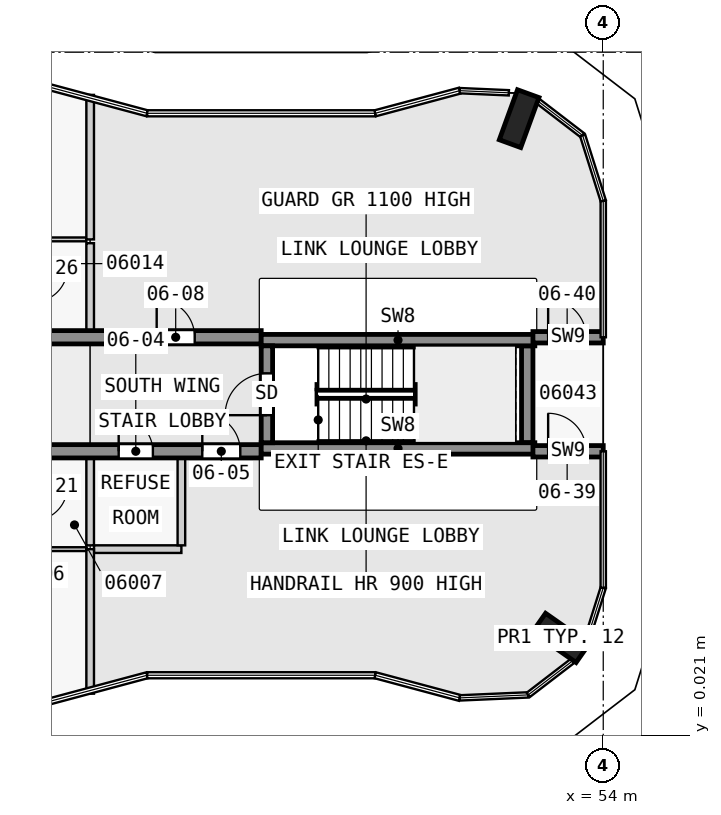
"""IFC4 building model, lengths in metres.
Left out: names, types, materials, properties, quantities, classifications, styles, units other than length and angle.
Written with IfcOpenShell. Run it as: python <this file> out.ifc"""

import sys

from ifc_helpers import new_model, si_unit, direction, frame, frame_2d, origin, origin_2d, place, context, subcontext, project, spatial, rectangle, extrude, element, fill, save


model = new_model("IFC4")
c1 = context("Model", 3, precision=1e-05, world=origin(), true_north=direction((0.0, 1.0)))
c2 = subcontext(c1, "Body", "Model", "MODEL_VIEW")
j1 = project(units=[si_unit("LENGTHUNIT", "METRE"), si_unit("PLANEANGLEUNIT", "RADIAN")], contexts=[c1])
p1 = place(None, origin())
s1 = spatial("IfcSite", under=j1, at=p1, CompositionType="ELEMENT")
p2 = place(p1, origin())
s2 = spatial("IfcBuilding", under=s1, at=p2, CompositionType="ELEMENT")
p3 = place(p2, frame((0.0, 0.0, 30.3)))
s3 = spatial("IfcBuildingStorey", under=s2, at=p3, CompositionType="ELEMENT", Elevation=30.3)
for number, where, z_axis, x_axis in (
    (1, (52.884, 2.59, 0.0), (0.0, 0.0, 1.0), (0.574, 0.819, 0.0)),
    (2, (51.787, 16.252, 0.0), (0.0, 0.0, 1.0), (-0.94, 0.342, 0.0)),
):
    element("IfcColumn", number, at=place(p3, frame(where, z_axis=z_axis, x_axis=x_axis)), inside=s3, PredefinedType="COLUMN", context=c2, shape_type="SweptSolid", body=[
        extrude(rectangle(XDim=0.6, YDim=1.4, at=origin_2d()), origin(), (0.0, 0.0, 1.0), 3.5),
    ])
p4 = place(p3, frame((45.15, 7.725, 0.0), z_axis=(0.0, 0.0, 1.0), x_axis=(0.0, 1.0, 0.0)))
e3 = element("IfcWall", 3, at=p4, inside=s3, PredefinedType="SHEAR", context=c2, shape_type="SweptSolid", body=[
    extrude(rectangle(XDim=2.55, YDim=0.3, at=frame_2d((1.275, 0.0))), origin(), (0.0, 0.0, 1.0), 3.5),
])
p5 = place(p4, frame((0.725, 0.0, 0.0)))
e4 = element("IfcOpeningElement", 4, at=p5, cuts=e3, PredefinedType="OPENING", context=c2, shape_type="SweptSolid", body=[
    extrude(rectangle(XDim=1.1, YDim=2.1, at=frame_2d((0.55, 1.05))), frame((0.0, 0.16, 0.0), z_axis=(0.0, -1.0, 0.0), x_axis=(1.0, 0.0, 0.0)), (0.0, 0.0, 1.0), 0.32),
])
p6 = place(p3, frame((52.0, 7.725, 0.0), z_axis=(0.0, 0.0, 1.0), x_axis=(0.0, 1.0, 0.0)))
e5 = element("IfcWall", 5, at=p6, inside=s3, PredefinedType="SHEAR", context=c2, shape_type="SweptSolid", body=[
    extrude(rectangle(XDim=2.55, YDim=0.3, at=frame_2d((1.275, 0.0))), origin(), (0.0, 0.0, 1.0), 3.5),
])
for number, where, z_axis, x_axis in (
    (6, (45.0, 7.575, 0.0), (0.0, 0.0, 1.0), (1.0, 0.0, 0.0)),
    (7, (45.0, 10.425, 0.0), (0.0, 0.0, 1.0), (1.0, 0.0, 0.0)),
):
    element("IfcWall", number, at=place(p3, frame(where, z_axis=z_axis, x_axis=x_axis)), inside=s3, PredefinedType="SHEAR", context=c2, shape_type="SweptSolid", body=[
        extrude(rectangle(XDim=7.2, YDim=0.3, at=frame_2d((3.6, 0.0))), origin(), (0.0, 0.0, 1.0), 3.5),
    ])
p7 = place(p3, frame((52.15, 7.5, 0.0), z_axis=(0.0, 0.0, 1.0), x_axis=(1.0, 0.0, 0.0)))
e8 = element("IfcWall", 8, at=p7, inside=s3, PredefinedType="SHEAR", context=c2, shape_type="SweptSolid", body=[
    extrude(rectangle(XDim=1.85, YDim=0.3, at=frame_2d((0.925, 0.0))), origin(), (0.0, 0.0, 1.0), 3.25),
])
p8 = place(p7, frame((0.4, 0.0, 0.0)))
e9 = element("IfcOpeningElement", 9, at=p8, cuts=e8, PredefinedType="OPENING", context=c2, shape_type="SweptSolid", body=[
    extrude(rectangle(XDim=1.0, YDim=2.1, at=frame_2d((0.5, 1.05))), frame((0.0, 0.16, 0.0), z_axis=(0.0, -1.0, 0.0), x_axis=(1.0, 0.0, 0.0)), (0.0, 0.0, 1.0), 0.32),
])
p9 = place(p3, frame((52.15, 10.5, 0.0), z_axis=(0.0, 0.0, 1.0), x_axis=(1.0, 0.0, 0.0)))
e10 = element("IfcWall", 10, at=p9, inside=s3, PredefinedType="SHEAR", context=c2, shape_type="SweptSolid", body=[
    extrude(rectangle(XDim=1.85, YDim=0.3, at=frame_2d((0.925, 0.0))), origin(), (0.0, 0.0, 1.0), 3.25),
])
p10 = place(p9, frame((0.4, 0.0, 0.0)))
e11 = element("IfcOpeningElement", 11, at=p10, cuts=e10, PredefinedType="OPENING", context=c2, shape_type="SweptSolid", body=[
    extrude(rectangle(XDim=1.0, YDim=2.1, at=frame_2d((0.5, 1.05))), frame((0.0, 0.16, 0.0), z_axis=(0.0, -1.0, 0.0), x_axis=(1.0, 0.0, 0.0)), (0.0, 0.0, 1.0), 0.32),
])
p11 = place(p3, frame((22.5, 7.5, 0.0), z_axis=(0.0, 0.0, 1.0), x_axis=(1.0, 0.0, 0.0)))
e12 = element("IfcWall", 12, at=p11, inside=s3, PredefinedType="SHEAR", context=c2, shape_type="SweptSolid", body=[
    extrude(rectangle(XDim=22.5, YDim=0.35, at=frame_2d((11.25, 0.0))), origin(), (0.0, 0.0, 1.0), 3.25),
])
p12 = place(p11, frame((4.05, 0.0, 0.0)))
e13 = element("IfcOpeningElement", 13, at=p12, cuts=e12, PredefinedType="OPENING", context=c2, shape_type="SweptSolid", body=[
    extrude(rectangle(XDim=1.0, YDim=2.1, at=frame_2d((0.5, 1.05))), frame((0.0, 0.185, 0.0), z_axis=(0.0, -1.0, 0.0), x_axis=(1.0, 0.0, 0.0)), (0.0, 0.0, 1.0), 0.37),
])
p13 = place(p11, frame((10.75, 0.0, 0.0)))
e14 = element("IfcOpeningElement", 14, at=p13, cuts=e12, PredefinedType="OPENING", context=c2, shape_type="SweptSolid", body=[
    extrude(rectangle(XDim=1.0, YDim=2.1, at=frame_2d((0.5, 1.05))), frame((0.0, 0.185, 0.0), z_axis=(0.0, -1.0, 0.0), x_axis=(1.0, 0.0, 0.0)), (0.0, 0.0, 1.0), 0.37),
])
p14 = place(p11, frame((15.25, 0.0, 0.0)))
e15 = element("IfcOpeningElement", 15, at=p14, cuts=e12, PredefinedType="OPENING", context=c2, shape_type="SweptSolid", body=[
    extrude(rectangle(XDim=1.0, YDim=2.1, at=frame_2d((0.5, 1.05))), frame((0.0, 0.185, 0.0), z_axis=(0.0, -1.0, 0.0), x_axis=(1.0, 0.0, 0.0)), (0.0, 0.0, 1.0), 0.37),
])
p15 = place(p11, frame((18.75, 0.0, 0.0)))
e16 = element("IfcOpeningElement", 16, at=p15, cuts=e12, PredefinedType="OPENING", context=c2, shape_type="SweptSolid", body=[
    extrude(rectangle(XDim=0.9, YDim=2.1, at=frame_2d((0.45, 1.05))), frame((0.0, 0.185, 0.0), z_axis=(0.0, -1.0, 0.0), x_axis=(1.0, 0.0, 0.0)), (0.0, 0.0, 1.0), 0.37),
])
p16 = place(p11, frame((20.95, 0.0, 0.0)))
e17 = element("IfcOpeningElement", 17, at=p16, cuts=e12, PredefinedType="OPENING", context=c2, shape_type="SweptSolid", body=[
    extrude(rectangle(XDim=1.0, YDim=2.1, at=frame_2d((0.5, 1.05))), frame((0.0, 0.185, 0.0), z_axis=(0.0, -1.0, 0.0), x_axis=(1.0, 0.0, 0.0)), (0.0, 0.0, 1.0), 0.37),
])
p17 = place(p3, frame((22.5, 10.5, 0.0), z_axis=(0.0, 0.0, 1.0), x_axis=(1.0, 0.0, 0.0)))
e18 = element("IfcWall", 18, at=p17, inside=s3, PredefinedType="SHEAR", context=c2, shape_type="SweptSolid", body=[
    extrude(rectangle(XDim=22.5, YDim=0.35, at=frame_2d((11.25, 0.0))), origin(), (0.0, 0.0, 1.0), 3.25),
])
p18 = place(p17, frame((6.05, 0.0, 0.0)))
e19 = element("IfcOpeningElement", 19, at=p18, cuts=e18, PredefinedType="OPENING", context=c2, shape_type="SweptSolid", body=[
    extrude(rectangle(XDim=1.0, YDim=2.1, at=frame_2d((0.5, 1.05))), frame((0.0, 0.185, 0.0), z_axis=(0.0, -1.0, 0.0), x_axis=(1.0, 0.0, 0.0)), (0.0, 0.0, 1.0), 0.37),
])
p19 = place(p17, frame((15.25, 0.0, 0.0)))
e20 = element("IfcOpeningElement", 20, at=p19, cuts=e18, PredefinedType="OPENING", context=c2, shape_type="SweptSolid", body=[
    extrude(rectangle(XDim=1.0, YDim=2.1, at=frame_2d((0.5, 1.05))), frame((0.0, 0.185, 0.0), z_axis=(0.0, -1.0, 0.0), x_axis=(1.0, 0.0, 0.0)), (0.0, 0.0, 1.0), 0.37),
])
p20 = place(p17, frame((19.75, 0.0, 0.0)))
e21 = element("IfcOpeningElement", 21, at=p20, cuts=e18, PredefinedType="OPENING", context=c2, shape_type="SweptSolid", body=[
    extrude(rectangle(XDim=1.0, YDim=2.1, at=frame_2d((0.5, 1.05))), frame((0.0, 0.185, 0.0), z_axis=(0.0, -1.0, 0.0), x_axis=(1.0, 0.0, 0.0)), (0.0, 0.0, 1.0), 0.37),
])
p21 = place(p3, frame((39.05, 4.925, 0.0), z_axis=(0.0, 0.0, 1.0), x_axis=(1.0, 0.0, 0.0)))
e22 = element("IfcWall", 22, at=p21, inside=s3, PredefinedType="PARTITIONING", context=c2, shape_type="SweptSolid", body=[
    extrude(rectangle(XDim=1.35, YDim=0.1, at=frame_2d((0.675, 0.0))), origin(), (0.0, 0.0, 1.0), 3.25),
])
p22 = place(p3, frame((40.6, 4.925, 0.0), z_axis=(0.0, 0.0, 1.0), x_axis=(1.0, 0.0, 0.0)))
e23 = element("IfcWall", 23, at=p22, inside=s3, PredefinedType="PARTITIONING", context=c2, shape_type="SweptSolid", body=[
    extrude(rectangle(XDim=2.3, YDim=0.2, at=frame_2d((1.15, 0.0))), origin(), (0.0, 0.0, 1.0), 3.25),
])
p23 = place(p3, frame((40.4, 13.075, 0.0), z_axis=(0.0, 0.0, 1.0), x_axis=(-1.0, 0.0, 0.0)))
e24 = element("IfcWall", 24, at=p23, inside=s3, PredefinedType="PARTITIONING", context=c2, shape_type="SweptSolid", body=[
    extrude(rectangle(XDim=1.35, YDim=0.1, at=frame_2d((0.675, 0.0))), origin(), (0.0, 0.0, 1.0), 3.25),
])
for number, where, z_axis, x_axis in (
    (25, (40.5, 4.925, 0.0), (0.0, 0.0, 1.0), (0.0, -1.0, 0.0)),
    (26, (40.5, 16.878, 0.0), (0.0, 0.0, 1.0), (0.0, -1.0, 0.0)),
):
    element("IfcWall", number, at=place(p3, frame(where, z_axis=z_axis, x_axis=x_axis)), inside=s3, PredefinedType="PARTITIONING", context=c2, shape_type="SweptSolid", body=[
        extrude(rectangle(XDim=3.803, YDim=0.2, at=frame_2d((1.901, 0.0))), origin(), (0.0, 0.0, 1.0), 3.25),
    ])
for number, where, z_axis, x_axis in (
    (27, (40.5, 5.025, 0.0), (0.0, 0.0, 1.0), (0.0, 1.0, 0.0)),
    (28, (40.5, 10.675, 0.0), (0.0, 0.0, 1.0), (0.0, 1.0, 0.0)),
    (29, (42.9, 5.025, 0.0), (0.0, 0.0, 1.0), (0.0, 1.0, 0.0)),
):
    element("IfcWall", number, at=place(p3, frame(where, z_axis=z_axis, x_axis=x_axis)), inside=s3, PredefinedType="PARTITIONING", context=c2, shape_type="SweptSolid", body=[
        extrude(rectangle(XDim=2.3, YDim=0.2, at=frame_2d((1.15, 0.0))), origin(), (0.0, 0.0, 1.0), 3.25),
    ])
p24 = place(p5, origin())
e30 = element("IfcDoor", 30, at=p24, inside=s3, OperationType="SINGLE_SWING_LEFT", PredefinedType="DOOR", context=c2, shape_type="SweptSolid", body=[
    extrude(rectangle(XDim=1.1, YDim=2.1, at=frame_2d((0.55, 1.05))), frame((0.0, 0.025, 0.0), z_axis=(0.0, -1.0, 0.0), x_axis=(1.0, 0.0, 0.0)), (0.0, 0.0, 1.0), 0.05),
])
fill(e4, e30)
p25 = place(p15, origin())
e31 = element("IfcDoor", 31, at=p25, inside=s3, OperationType="SINGLE_SWING_RIGHT", PredefinedType="DOOR", context=c2, shape_type="SweptSolid", body=[
    extrude(rectangle(XDim=0.9, YDim=2.1, at=frame_2d((0.45, 1.05))), frame((0.0, 0.025, 0.0), z_axis=(0.0, -1.0, 0.0), x_axis=(1.0, 0.0, 0.0)), (0.0, 0.0, 1.0), 0.05),
])
fill(e16, e31)
p26 = place(p16, origin())
e32 = element("IfcDoor", 32, at=p26, inside=s3, OperationType="SINGLE_SWING_RIGHT", PredefinedType="DOOR", context=c2, shape_type="SweptSolid", body=[
    extrude(rectangle(XDim=1.0, YDim=2.1, at=frame_2d((0.5, 1.05))), frame((0.0, 0.025, 0.0), z_axis=(0.0, -1.0, 0.0), x_axis=(1.0, 0.0, 0.0)), (0.0, 0.0, 1.0), 0.05),
])
fill(e17, e32)
p27 = place(p20, origin())
e33 = element("IfcDoor", 33, at=p27, inside=s3, OperationType="SINGLE_SWING_RIGHT", PredefinedType="DOOR", context=c2, shape_type="SweptSolid", body=[
    extrude(rectangle(XDim=1.0, YDim=2.1, at=frame_2d((0.5, 1.05))), frame((0.0, 0.025, 0.0), z_axis=(0.0, -1.0, 0.0), x_axis=(1.0, 0.0, 0.0)), (0.0, 0.0, 1.0), 0.05),
])
fill(e21, e33)
p28 = place(p8, origin())
e34 = element("IfcDoor", 34, at=p28, inside=s3, OperationType="SINGLE_SWING_LEFT", PredefinedType="DOOR", context=c2, shape_type="SweptSolid", body=[
    extrude(rectangle(XDim=1.0, YDim=2.1, at=frame_2d((0.5, 1.05))), frame((0.0, 0.025, 0.0), z_axis=(0.0, -1.0, 0.0), x_axis=(1.0, 0.0, 0.0)), (0.0, 0.0, 1.0), 0.05),
])
fill(e9, e34)
p29 = place(p10, origin())
e35 = element("IfcDoor", 35, at=p29, inside=s3, OperationType="SINGLE_SWING_LEFT", PredefinedType="DOOR", context=c2, shape_type="SweptSolid", body=[
    extrude(rectangle(XDim=1.0, YDim=2.1, at=frame_2d((0.5, 1.05))), frame((0.0, 0.025, 0.0), z_axis=(0.0, -1.0, 0.0), x_axis=(1.0, 0.0, 0.0)), (0.0, 0.0, 1.0), 0.05),
])
fill(e11, e35)
save(model, sys.argv[1])
